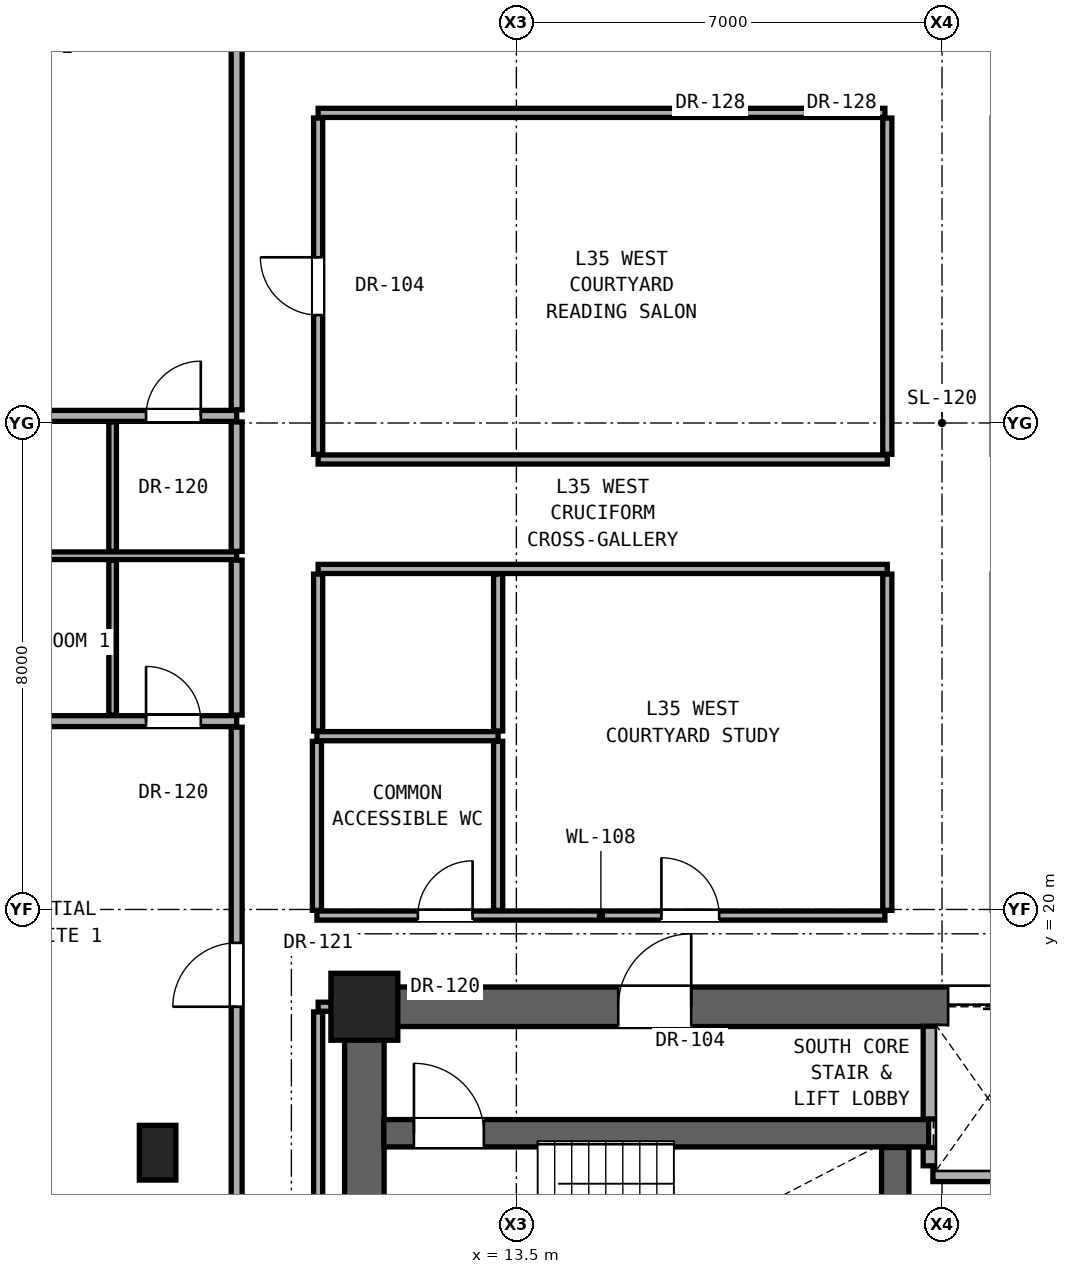
"""IFC4 building model, lengths in metres.
Left out: names, types, materials, properties, quantities, classifications, styles, units other than length and angle.
Written with IfcOpenShell. Run it as: python <this file> out.ifc"""

import sys

from ifc_helpers import new_model, si_unit, direction, frame, frame_2d, origin, origin_2d, place, context, subcontext, project, spatial, rectangle, extrude, element, fill, save


model = new_model("IFC4")
c1 = context("Model", 3, precision=1e-05, world=origin(), true_north=direction((0.0, 1.0)))
c2 = subcontext(c1, "Body", "Model", "MODEL_VIEW")
j1 = project(units=[si_unit("LENGTHUNIT", "METRE"), si_unit("PLANEANGLEUNIT", "RADIAN")], contexts=[c1])
p1 = place(None, origin())
s1 = spatial("IfcSite", under=j1, at=p1, CompositionType="ELEMENT")
p2 = place(p1, origin())
s2 = spatial("IfcBuilding", under=s1, at=p2, CompositionType="ELEMENT")
p3 = place(p2, frame((0.0, 0.0, 124.7)))
s3 = spatial("IfcBuildingStorey", under=s2, at=p3, CompositionType="ELEMENT", Elevation=124.7)
p4 = place(p3, frame((11.0, 18.4, 0.0), z_axis=(0.0, 0.0, 1.0), x_axis=(1.0, 0.0, 0.0)))
e1 = element("IfcColumn", 1, at=p4, inside=s3, PredefinedType="COLUMN", context=c2, shape_type="SweptSolid", body=[
    extrude(rectangle(XDim=1.1, YDim=1.1, at=origin_2d()), origin(), (0.0, 0.0, 1.0), 3.3),
])
p5 = place(p3, frame((7.6, 16.0, 0.0), z_axis=(0.0, 0.0, 1.0), x_axis=(1.0, 0.0, 0.0)))
e2 = element("IfcColumn", 2, at=p5, inside=s3, PredefinedType="PILASTER", context=c2, shape_type="SweptSolid", body=[
    extrude(rectangle(XDim=0.6, YDim=0.9, at=origin_2d()), origin(), (0.0, 0.0, 1.0), 3.3),
])
p6 = place(p3, frame((11.0, 12.4, 0.0), z_axis=(0.0, 0.0, 1.0), x_axis=(0.0, 1.0, 0.0)))
e3 = element("IfcWall", 3, at=p6, inside=s3, PredefinedType="SHEAR", context=c2, shape_type="SweptSolid", body=[
    extrude(rectangle(XDim=6.0, YDim=0.65, at=frame_2d((3.0, 0.0))), origin(), (0.0, 0.0, 1.0), 3.08),
])
p7 = place(p3, frame((11.0, 18.4, 0.0), z_axis=(0.0, 0.0, 1.0), x_axis=(1.0, 0.0, 0.0)))
e4 = element("IfcWall", 4, at=p7, inside=s3, PredefinedType="SHEAR", context=c2, shape_type="SweptSolid", body=[
    extrude(rectangle(XDim=19.0, YDim=0.65, at=frame_2d((9.5, 0.0))), origin(), (0.0, 0.0, 1.0), 3.08),
])
p8 = place(p7, frame((4.175, 0.0, 0.0)))
e5 = element("IfcOpeningElement", 5, at=p8, cuts=e4, PredefinedType="OPENING", context=c2, shape_type="SweptSolid", body=[
    extrude(rectangle(XDim=1.2, YDim=2.25, at=frame_2d((0.6, 1.125))), frame((0.0, 0.335, 0.0), z_axis=(0.0, -1.0, 0.0), x_axis=(1.0, 0.0, 0.0)), (0.0, 0.0, 1.0), 0.67),
])
p9 = place(p7, frame((9.6, 0.0, 0.0)))
e6 = element("IfcOpeningElement", 6, at=p9, cuts=e4, PredefinedType="OPENING", context=c2, shape_type="SweptSolid", body=[
    extrude(rectangle(XDim=1.3, YDim=2.3, at=frame_2d((0.65, 1.15))), frame((0.0, 0.335, 0.0), z_axis=(0.0, -1.0, 0.0), x_axis=(1.0, 0.0, 0.0)), (0.0, 0.0, 1.0), 0.67),
])
p10 = place(p7, frame((11.9, 0.0, 0.0)))
e7 = element("IfcOpeningElement", 7, at=p10, cuts=e4, PredefinedType="OPENING", context=c2, shape_type="SweptSolid", body=[
    extrude(rectangle(XDim=1.3, YDim=2.3, at=frame_2d((0.65, 1.15))), frame((0.0, 0.335, 0.0), z_axis=(0.0, -1.0, 0.0), x_axis=(1.0, 0.0, 0.0)), (0.0, 0.0, 1.0), 0.67),
])
p11 = place(p7, frame((14.3, 0.0, 0.0)))
e8 = element("IfcOpeningElement", 8, at=p11, cuts=e4, PredefinedType="OPENING", context=c2, shape_type="SweptSolid", body=[
    extrude(rectangle(XDim=1.3, YDim=2.3, at=frame_2d((0.65, 1.15))), frame((0.0, 0.335, 0.0), z_axis=(0.0, -1.0, 0.0), x_axis=(1.0, 0.0, 0.0)), (0.0, 0.0, 1.0), 0.67),
])
p12 = place(p7, frame((16.6, 0.0, 0.0)))
e9 = element("IfcOpeningElement", 9, at=p12, cuts=e4, PredefinedType="OPENING", context=c2, shape_type="SweptSolid", body=[
    extrude(rectangle(XDim=1.3, YDim=2.3, at=frame_2d((0.65, 1.15))), frame((0.0, 0.335, 0.0), z_axis=(0.0, -1.0, 0.0), x_axis=(1.0, 0.0, 0.0)), (0.0, 0.0, 1.0), 0.67),
])
p13 = place(p3, frame((20.35, 15.65, 0.0), z_axis=(0.0, 0.0, 1.0), x_axis=(1.0, 0.0, 0.0)))
e10 = element("IfcWall", 10, at=p13, inside=s3, PredefinedType="SOLIDWALL", context=c2, shape_type="SweptSolid", body=[
    extrude(rectangle(XDim=4.15, YDim=0.25, at=frame_2d((2.075, 0.0))), origin(), (0.0, 0.0, 1.0), 3.08),
])
p14 = place(p3, frame((11.32, 16.32, 0.0), z_axis=(0.0, 0.0, 1.0), x_axis=(1.0, 0.0, 0.0)))
e11 = element("IfcWall", 11, at=p14, inside=s3, PredefinedType="SHEAR", context=c2, shape_type="SweptSolid", body=[
    extrude(rectangle(XDim=8.96, YDim=0.45, at=frame_2d((4.48, 0.0))), origin(), (0.0, 0.0, 1.0), 3.08),
])
p15 = place(p14, frame((0.495, 0.0, 0.0)))
e12 = element("IfcOpeningElement", 12, at=p15, cuts=e11, PredefinedType="OPENING", context=c2, shape_type="SweptSolid", body=[
    extrude(rectangle(XDim=1.15, YDim=2.2, at=frame_2d((0.575, 1.1))), frame((0.0, 0.235, 0.0), z_axis=(0.0, -1.0, 0.0), x_axis=(1.0, 0.0, 0.0)), (0.0, 0.0, 1.0), 0.47),
])
p16 = place(p3, frame((10.24, 18.4, 0.0), z_axis=(0.0, 0.0, 1.0), x_axis=(1.0, 0.0, 0.0)))
e13 = element("IfcWall", 13, at=p16, inside=s3, PredefinedType="PARTITIONING", context=c2, shape_type="SweptSolid", body=[
    extrude(rectangle(XDim=0.44, YDim=0.15, at=frame_2d((0.22, 0.0))), origin(), (0.0, 0.0, 1.0), 2.456),
])
p17 = place(p3, frame((10.22, 19.9, 0.0), z_axis=(0.0, 0.0, 1.0), x_axis=(1.0, 0.0, 0.0)))
e14 = element("IfcWall", 14, at=p17, inside=s3, PredefinedType="PARTITIONING", context=c2, shape_type="SweptSolid", body=[
    extrude(rectangle(XDim=9.34, YDim=0.15, at=frame_2d((4.67, 0.0))), origin(), (0.0, 0.0, 1.0), 2.216),
])
p18 = place(p17, frame((1.66, 0.0, 0.0)))
e15 = element("IfcOpeningElement", 15, at=p18, cuts=e14, PredefinedType="OPENING", context=c2, shape_type="SweptSolid", body=[
    extrude(rectangle(XDim=0.9, YDim=2.1, at=frame_2d((0.45, 1.05))), frame((0.0, 0.085, 0.0), z_axis=(0.0, -1.0, 0.0), x_axis=(1.0, 0.0, 0.0)), (0.0, 0.0, 1.0), 0.17),
])
p19 = place(p17, frame((5.665, 0.0, 0.0)))
e16 = element("IfcOpeningElement", 16, at=p19, cuts=e14, PredefinedType="OPENING", context=c2, shape_type="SweptSolid", body=[
    extrude(rectangle(XDim=0.95, YDim=2.15, at=frame_2d((0.475, 1.075))), frame((0.0, 0.085, 0.0), z_axis=(0.0, -1.0, 0.0), x_axis=(1.0, 0.0, 0.0)), (0.0, 0.0, 1.0), 0.17),
])
p20 = place(p3, frame((10.22, 22.85, 0.0), z_axis=(0.0, 0.0, 1.0), x_axis=(1.0, 0.0, 0.0)))
e17 = element("IfcWall", 17, at=p20, inside=s3, PredefinedType="PARTITIONING", context=c2, shape_type="SweptSolid", body=[
    extrude(rectangle(XDim=2.98, YDim=0.15, at=frame_2d((1.49, 0.0))), origin(), (0.0, 0.0, 1.0), 2.216),
])
p21 = place(p3, frame((0.06, 23.097, 0.0), z_axis=(0.0, 0.0, 1.0), x_axis=(1.0, 0.0, 0.0)))
e18 = element("IfcWall", 18, at=p21, inside=s3, PredefinedType="PARTITIONING", context=c2, shape_type="SweptSolid", body=[
    extrude(rectangle(XDim=8.84, YDim=0.18, at=frame_2d((4.42, 0.0))), origin(), (0.0, 0.0, 1.0), 2.299),
])
p22 = place(p21, frame((2.945, 0.0, 0.0)))
e19 = element("IfcOpeningElement", 19, at=p22, cuts=e18, PredefinedType="OPENING", context=c2, shape_type="SweptSolid", body=[
    extrude(rectangle(XDim=0.95, YDim=2.15, at=frame_2d((0.475, 1.075))), frame((0.0, 0.1, 0.0), z_axis=(0.0, -1.0, 0.0), x_axis=(1.0, 0.0, 0.0)), (0.0, 0.0, 1.0), 0.2),
])
p23 = place(p21, frame((7.35, 0.0, 0.0)))
e20 = element("IfcOpeningElement", 20, at=p23, cuts=e18, PredefinedType="OPENING", context=c2, shape_type="SweptSolid", body=[
    extrude(rectangle(XDim=0.9, YDim=2.1, at=frame_2d((0.45, 1.05))), frame((0.0, 0.1, 0.0), z_axis=(0.0, -1.0, 0.0), x_axis=(1.0, 0.0, 0.0)), (0.0, 0.0, 1.0), 0.2),
])
p24 = place(p3, frame((10.24, 25.6, 0.0), z_axis=(0.0, 0.0, 1.0), x_axis=(1.0, 0.0, 0.0)))
e21 = element("IfcWall", 21, at=p24, inside=s3, PredefinedType="PARTITIONING", context=c2, shape_type="SweptSolid", body=[
    extrude(rectangle(XDim=9.36, YDim=0.15, at=frame_2d((4.68, 0.0))), origin(), (0.0, 0.0, 1.0), 2.216),
])
p25 = place(p3, frame((0.06, 25.817, 0.0), z_axis=(0.0, 0.0, 1.0), x_axis=(1.0, 0.0, 0.0)))
e22 = element("IfcWall", 22, at=p25, inside=s3, PredefinedType="PARTITIONING", context=c2, shape_type="SweptSolid", body=[
    extrude(rectangle(XDim=8.84, YDim=0.125, at=frame_2d((4.42, 0.0))), origin(), (0.0, 0.0, 1.0), 2.299),
])
p26 = place(p3, frame((10.24, 27.4, 0.0), z_axis=(0.0, 0.0, 1.0), x_axis=(1.0, 0.0, 0.0)))
e23 = element("IfcWall", 23, at=p26, inside=s3, PredefinedType="PARTITIONING", context=c2, shape_type="SweptSolid", body=[
    extrude(rectangle(XDim=9.36, YDim=0.15, at=frame_2d((4.68, 0.0))), origin(), (0.0, 0.0, 1.0), 2.216),
])
p27 = place(p3, frame((0.06, 28.117, 0.0), z_axis=(0.0, 0.0, 1.0), x_axis=(1.0, 0.0, 0.0)))
e24 = element("IfcWall", 24, at=p27, inside=s3, PredefinedType="PARTITIONING", context=c2, shape_type="SweptSolid", body=[
    extrude(rectangle(XDim=8.84, YDim=0.18, at=frame_2d((4.42, 0.0))), origin(), (0.0, 0.0, 1.0), 2.299),
])
p28 = place(p27, frame((2.945, 0.0, 0.0)))
e25 = element("IfcOpeningElement", 25, at=p28, cuts=e24, PredefinedType="OPENING", context=c2, shape_type="SweptSolid", body=[
    extrude(rectangle(XDim=0.95, YDim=2.15, at=frame_2d((0.475, 1.075))), frame((0.0, 0.1, 0.0), z_axis=(0.0, -1.0, 0.0), x_axis=(1.0, 0.0, 0.0)), (0.0, 0.0, 1.0), 0.2),
])
p29 = place(p27, frame((7.35, 0.0, 0.0)))
e26 = element("IfcOpeningElement", 26, at=p29, cuts=e24, PredefinedType="OPENING", context=c2, shape_type="SweptSolid", body=[
    extrude(rectangle(XDim=0.9, YDim=2.1, at=frame_2d((0.45, 1.05))), frame((0.0, 0.1, 0.0), z_axis=(0.0, -1.0, 0.0), x_axis=(1.0, 0.0, 0.0)), (0.0, 0.0, 1.0), 0.2),
])
p30 = place(p3, frame((10.24, 33.1, 0.0), z_axis=(0.0, 0.0, 1.0), x_axis=(1.0, 0.0, 0.0)))
e27 = element("IfcWall", 27, at=p30, inside=s3, PredefinedType="PARTITIONING", context=c2, shape_type="SweptSolid", body=[
    extrude(rectangle(XDim=9.32, YDim=0.15, at=frame_2d((4.66, 0.0))), origin(), (0.0, 0.0, 1.0), 2.216),
])
p31 = place(p3, frame((6.86, 23.197, 0.0), z_axis=(0.0, 0.0, 1.0), x_axis=(0.0, 1.0, 0.0)))
e28 = element("IfcWall", 28, at=p31, inside=s3, PredefinedType="PARTITIONING", context=c2, shape_type="SweptSolid", body=[
    extrude(rectangle(XDim=2.547, YDim=0.125, at=frame_2d((1.274, 0.0))), origin(), (0.0, 0.0, 1.0), 2.299),
])
p32 = place(p3, frame((6.86, 25.889, 0.0), z_axis=(0.0, 0.0, 1.0), x_axis=(0.0, 1.0, 0.0)))
e29 = element("IfcWall", 29, at=p32, inside=s3, PredefinedType="PARTITIONING", context=c2, shape_type="SweptSolid", body=[
    extrude(rectangle(XDim=2.128, YDim=0.125, at=frame_2d((1.064, 0.0))), origin(), (0.0, 0.0, 1.0), 3.08),
])
p33 = place(p3, frame((8.9, 14.854, 0.0), z_axis=(0.0, 0.0, 1.0), x_axis=(0.0, 1.0, 0.0)))
e30 = element("IfcWall", 30, at=p33, inside=s3, PredefinedType="PARTITIONING", context=c2, shape_type="SweptSolid", body=[
    extrude(rectangle(XDim=8.143, YDim=0.18, at=frame_2d((4.072, 0.0))), origin(), (0.0, 0.0, 1.0), 2.456),
])
p34 = place(p33, frame((3.546, 0.0, 0.0)))
e31 = element("IfcOpeningElement", 31, at=p34, cuts=e30, PredefinedType="OPENING", context=c2, shape_type="SweptSolid", body=[
    extrude(rectangle(XDim=1.05, YDim=2.2, at=frame_2d((0.525, 1.1))), frame((0.0, 0.1, 0.0), z_axis=(0.0, -1.0, 0.0), x_axis=(1.0, 0.0, 0.0)), (0.0, 0.0, 1.0), 0.2),
])
p35 = place(p3, frame((8.9, 23.197, 0.0), z_axis=(0.0, 0.0, 1.0), x_axis=(0.0, 1.0, 0.0)))
e32 = element("IfcWall", 32, at=p35, inside=s3, PredefinedType="PARTITIONING", context=c2, shape_type="SweptSolid", body=[
    extrude(rectangle(XDim=2.547, YDim=0.18, at=frame_2d((1.274, 0.0))), origin(), (0.0, 0.0, 1.0), 2.299),
])
p36 = place(p3, frame((8.9, 25.889, 0.0), z_axis=(0.0, 0.0, 1.0), x_axis=(0.0, 1.0, 0.0)))
e33 = element("IfcWall", 33, at=p36, inside=s3, PredefinedType="PARTITIONING", context=c2, shape_type="SweptSolid", body=[
    extrude(rectangle(XDim=2.128, YDim=0.18, at=frame_2d((1.064, 0.0))), origin(), (0.0, 0.0, 1.0), 3.08),
])
p37 = place(p3, frame((8.9, 28.217, 0.0), z_axis=(0.0, 0.0, 1.0), x_axis=(0.0, 1.0, 0.0)))
e34 = element("IfcWall", 34, at=p37, inside=s3, PredefinedType="PARTITIONING", context=c2, shape_type="SweptSolid", body=[
    extrude(rectangle(XDim=12.929, YDim=0.18, at=frame_2d((6.464, 0.0))), origin(), (0.0, 0.0, 1.0), 2.299),
])
p38 = place(p37, frame((5.939, 0.0, 0.0)))
e35 = element("IfcOpeningElement", 35, at=p38, cuts=e34, PredefinedType="OPENING", context=c2, shape_type="SweptSolid", body=[
    extrude(rectangle(XDim=1.05, YDim=2.2, at=frame_2d((0.525, 1.1))), frame((0.0, 0.1, 0.0), z_axis=(0.0, -1.0, 0.0), x_axis=(1.0, 0.0, 0.0)), (0.0, 0.0, 1.0), 0.2),
])
p39 = place(p3, frame((10.22, 19.985, 0.0), z_axis=(0.0, 0.0, 1.0), x_axis=(0.0, 1.0, 0.0)))
e36 = element("IfcWall", 36, at=p39, inside=s3, PredefinedType="PARTITIONING", context=c2, shape_type="SweptSolid", body=[
    extrude(rectangle(XDim=2.78, YDim=0.15, at=frame_2d((1.39, 0.0))), origin(), (0.0, 0.0, 1.0), 3.08),
])
p40 = place(p3, frame((10.24, 12.335, 0.0), z_axis=(0.0, 0.0, 1.0), x_axis=(0.0, 1.0, 0.0)))
e37 = element("IfcWall", 37, at=p40, inside=s3, PredefinedType="PARTITIONING", context=c2, shape_type="SweptSolid", body=[
    extrude(rectangle(XDim=5.98, YDim=0.15, at=frame_2d((2.99, 0.0))), origin(), (0.0, 0.0, 1.0), 2.456),
])
p41 = place(p3, frame((10.24, 22.935, 0.0), z_axis=(0.0, 0.0, 1.0), x_axis=(0.0, 1.0, 0.0)))
e38 = element("IfcWall", 38, at=p41, inside=s3, PredefinedType="PARTITIONING", context=c2, shape_type="SweptSolid", body=[
    extrude(rectangle(XDim=2.58, YDim=0.15, at=frame_2d((1.29, 0.0))), origin(), (0.0, 0.0, 1.0), 2.299),
])
p42 = place(p3, frame((10.24, 27.485, 0.0), z_axis=(0.0, 0.0, 1.0), x_axis=(0.0, 1.0, 0.0)))
e39 = element("IfcWall", 39, at=p42, inside=s3, PredefinedType="PARTITIONING", context=c2, shape_type="SweptSolid", body=[
    extrude(rectangle(XDim=5.53, YDim=0.15, at=frame_2d((2.765, 0.0))), origin(), (0.0, 0.0, 1.0), 2.299),
])
p43 = place(p42, frame((2.29, 0.0, 0.0)))
e40 = element("IfcOpeningElement", 40, at=p43, cuts=e39, PredefinedType="OPENING", context=c2, shape_type="SweptSolid", body=[
    extrude(rectangle(XDim=0.95, YDim=2.15, at=frame_2d((0.475, 1.075))), frame((0.0, 0.085, 0.0), z_axis=(0.0, -1.0, 0.0), x_axis=(1.0, 0.0, 0.0)), (0.0, 0.0, 1.0), 0.17),
])
p44 = place(p3, frame((13.2, 19.985, 0.0), z_axis=(0.0, 0.0, 1.0), x_axis=(0.0, 1.0, 0.0)))
e41 = element("IfcWall", 41, at=p44, inside=s3, PredefinedType="PARTITIONING", context=c2, shape_type="SweptSolid", body=[
    extrude(rectangle(XDim=2.78, YDim=0.15, at=frame_2d((1.39, 0.0))), origin(), (0.0, 0.0, 1.0), 3.08),
])
p45 = place(p3, frame((13.2, 22.935, 0.0), z_axis=(0.0, 0.0, 1.0), x_axis=(0.0, 1.0, 0.0)))
e42 = element("IfcWall", 42, at=p45, inside=s3, PredefinedType="PARTITIONING", context=c2, shape_type="SweptSolid", body=[
    extrude(rectangle(XDim=2.58, YDim=0.15, at=frame_2d((1.29, 0.0))), origin(), (0.0, 0.0, 1.0), 2.216),
])
for number, where, z_axis, x_axis in (
    (43, (19.6, 19.985, 0.0), (0.0, 0.0, 1.0), (0.0, 1.0, 0.0)),
    (44, (19.6, 27.485, 0.0), (0.0, 0.0, 1.0), (0.0, 1.0, 0.0)),
):
    element("IfcWall", number, at=place(p3, frame(where, z_axis=z_axis, x_axis=x_axis)), inside=s3, PredefinedType="PARTITIONING", context=c2, shape_type="SweptSolid", body=[
        extrude(rectangle(XDim=5.53, YDim=0.15, at=frame_2d((2.765, 0.0))), origin(), (0.0, 0.0, 1.0), 2.216),
    ])
p46 = place(p3, frame((19.73, 13.355, 0.0), z_axis=(0.0, 0.0, 1.0), x_axis=(0.0, 1.0, 0.0)))
e45 = element("IfcWall", 45, at=p46, inside=s3, PredefinedType="SHEAR", context=c2, shape_type="SweptSolid", body=[
    extrude(rectangle(XDim=2.73, YDim=0.45, at=frame_2d((1.365, 0.0))), origin(), (0.0, 0.0, 1.0), 3.08),
])
p47 = place(p3, frame((20.315, 15.785, 0.0), z_axis=(0.0, 0.0, 1.0), x_axis=(0.0, 1.0, 0.0)))
e46 = element("IfcWall", 46, at=p47, inside=s3, PredefinedType="SOLIDWALL", context=c2, shape_type="SweptSolid", body=[
    extrude(rectangle(XDim=0.3, YDim=0.25, at=frame_2d((0.15, 0.0))), origin(), (0.0, 0.0, 1.0), 3.08),
])
p48 = place(p3, frame((20.315, 16.555, 0.0), z_axis=(0.0, 0.0, 1.0), x_axis=(0.0, 1.0, 0.0)))
e47 = element("IfcWall", 47, at=p48, inside=s3, PredefinedType="SOLIDWALL", context=c2, shape_type="SweptSolid", body=[
    extrude(rectangle(XDim=1.525, YDim=0.25, at=frame_2d((0.763, 0.0))), origin(), (0.0, 0.0, 1.0), 3.08),
])
p49 = place(p8, origin())
e48 = element("IfcDoor", 48, at=p49, inside=s3, OperationType="SINGLE_SWING_RIGHT", PredefinedType="DOOR", context=c2, shape_type="SweptSolid", body=[
    extrude(rectangle(XDim=1.2, YDim=2.25, at=frame_2d((0.6, 1.125))), frame((0.0, 0.025, 0.0), z_axis=(0.0, -1.0, 0.0), x_axis=(1.0, 0.0, 0.0)), (0.0, 0.0, 1.0), 0.05),
])
fill(e5, e48)
p50 = place(p15, origin())
e49 = element("IfcDoor", 49, at=p50, inside=s3, OperationType="SINGLE_SWING_LEFT", PredefinedType="DOOR", context=c2, shape_type="SweptSolid", body=[
    extrude(rectangle(XDim=1.15, YDim=2.2, at=frame_2d((0.575, 1.1))), frame((0.0, 0.025, 0.0), z_axis=(0.0, -1.0, 0.0), x_axis=(1.0, 0.0, 0.0)), (0.0, 0.0, 1.0), 0.05),
])
fill(e12, e49)
p51 = place(p18, origin())
e50 = element("IfcDoor", 50, at=p51, inside=s3, OperationType="SINGLE_SWING_RIGHT", PredefinedType="DOOR", context=c2, shape_type="SweptSolid", body=[
    extrude(rectangle(XDim=0.9, YDim=2.1, at=frame_2d((0.45, 1.05))), frame((0.0, 0.025, 0.0), z_axis=(0.0, -1.0, 0.0), x_axis=(1.0, 0.0, 0.0)), (0.0, 0.0, 1.0), 0.05),
])
fill(e15, e50)
p52 = place(p34, origin())
e51 = element("IfcDoor", 51, at=p52, inside=s3, OperationType="SINGLE_SWING_LEFT", PredefinedType="DOOR", context=c2, shape_type="SweptSolid", body=[
    extrude(rectangle(XDim=1.05, YDim=2.2, at=frame_2d((0.525, 1.1))), frame((0.0, 0.025, 0.0), z_axis=(0.0, -1.0, 0.0), x_axis=(1.0, 0.0, 0.0)), (0.0, 0.0, 1.0), 0.05),
])
fill(e31, e51)
p53 = place(p23, origin())
e52 = element("IfcDoor", 52, at=p53, inside=s3, OperationType="SINGLE_SWING_LEFT", PredefinedType="DOOR", context=c2, shape_type="SweptSolid", body=[
    extrude(rectangle(XDim=0.9, YDim=2.1, at=frame_2d((0.45, 1.05))), frame((0.0, 0.025, 0.0), z_axis=(0.0, -1.0, 0.0), x_axis=(1.0, 0.0, 0.0)), (0.0, 0.0, 1.0), 0.05),
])
fill(e20, e52)
p54 = place(p29, origin())
e53 = element("IfcDoor", 53, at=p54, inside=s3, OperationType="SINGLE_SWING_RIGHT", PredefinedType="DOOR", context=c2, shape_type="SweptSolid", body=[
    extrude(rectangle(XDim=0.9, YDim=2.1, at=frame_2d((0.45, 1.05))), frame((0.0, 0.025, 0.0), z_axis=(0.0, -1.0, 0.0), x_axis=(1.0, 0.0, 0.0)), (0.0, 0.0, 1.0), 0.05),
])
fill(e26, e53)
p55 = place(p19, origin())
e54 = element("IfcDoor", 54, at=p55, inside=s3, OperationType="SINGLE_SWING_LEFT", PredefinedType="DOOR", context=c2, shape_type="SweptSolid", body=[
    extrude(rectangle(XDim=0.95, YDim=2.15, at=frame_2d((0.475, 1.075))), frame((0.0, 0.025, 0.0), z_axis=(0.0, -1.0, 0.0), x_axis=(1.0, 0.0, 0.0)), (0.0, 0.0, 1.0), 0.05),
])
fill(e16, e54)
p56 = place(p43, origin())
e55 = element("IfcDoor", 55, at=p56, inside=s3, OperationType="SINGLE_SWING_RIGHT", PredefinedType="DOOR", context=c2, shape_type="SweptSolid", body=[
    extrude(rectangle(XDim=0.95, YDim=2.15, at=frame_2d((0.475, 1.075))), frame((0.0, 0.025, 0.0), z_axis=(0.0, -1.0, 0.0), x_axis=(1.0, 0.0, 0.0)), (0.0, 0.0, 1.0), 0.05),
])
fill(e40, e55)
p57 = place(p9, origin())
e56 = element("IfcDoor", 56, at=p57, inside=s3, OperationType="DOUBLE_DOOR_SLIDING", PredefinedType="DOOR", context=c2, shape_type="SweptSolid", body=[
    extrude(rectangle(XDim=1.3, YDim=2.3, at=frame_2d((0.65, 1.15))), frame((0.0, 0.025, 0.0), z_axis=(0.0, -1.0, 0.0), x_axis=(1.0, 0.0, 0.0)), (0.0, 0.0, 1.0), 0.05),
])
fill(e6, e56)
save(model, sys.argv[1])
